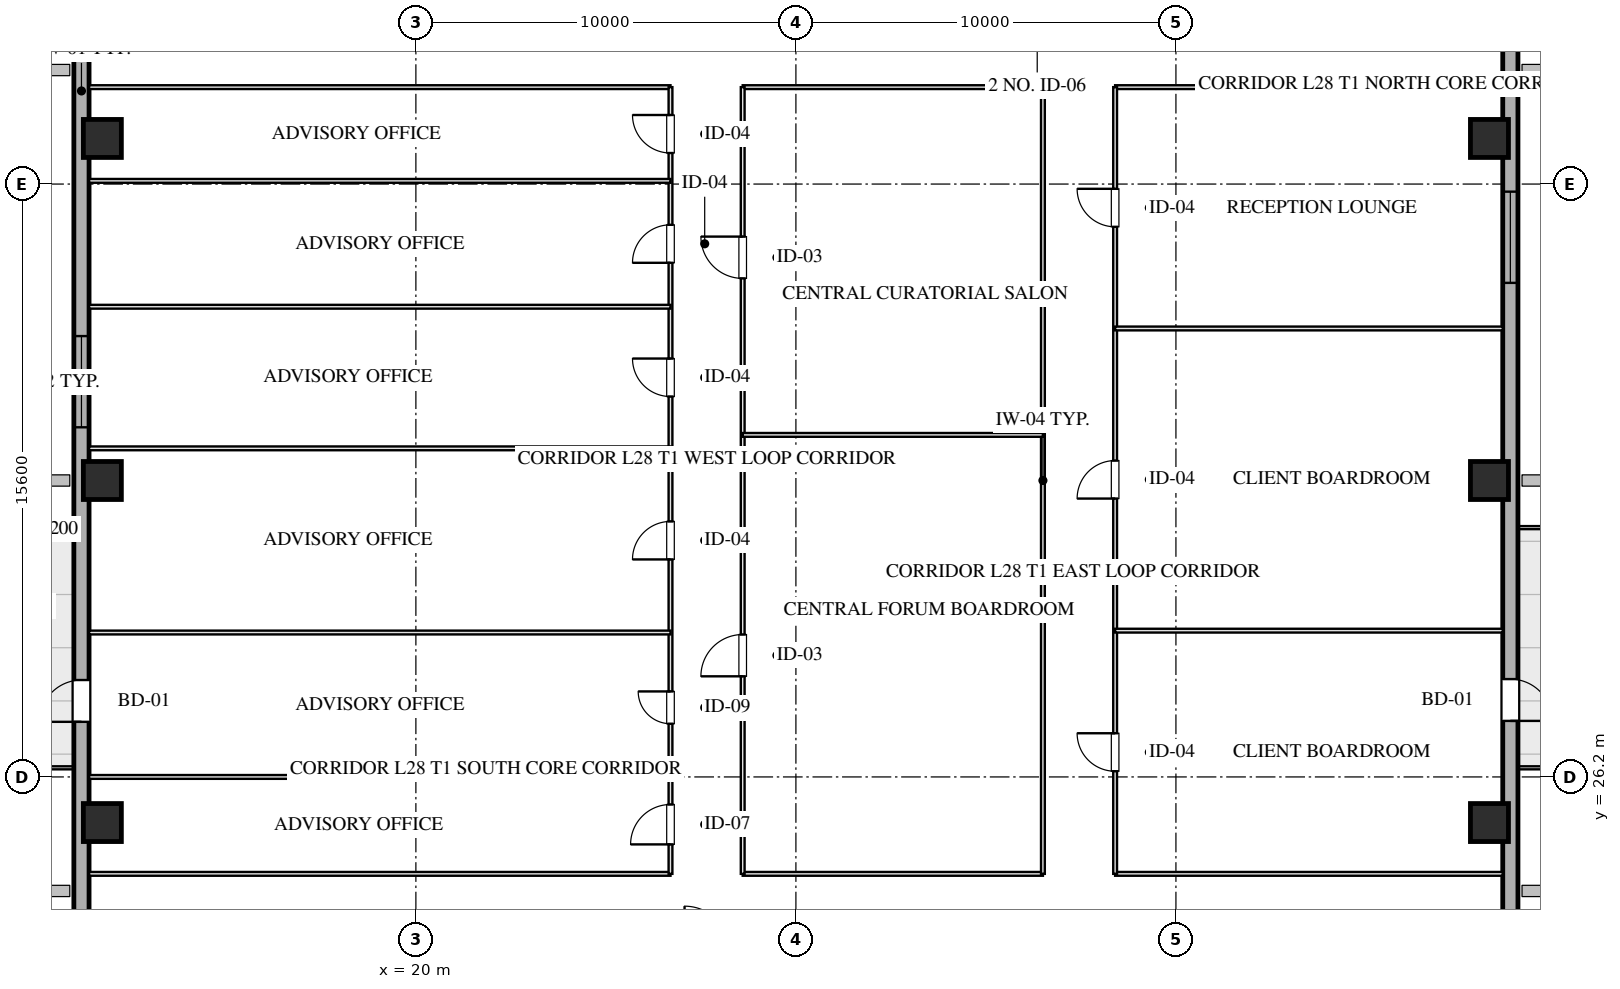
"""IFC4 building model, lengths in metres.
Left out: names, types, materials, properties, quantities, classifications, styles, units other than length and angle.
Written with IfcOpenShell. Run it as: python <this file> out.ifc"""

import sys

from ifc_helpers import new_model, si_unit, direction, frame, frame_2d, origin, origin_2d, place, context, subcontext, project, spatial, rectangle, hollow_rectangle, extrude, element, fill, save


model = new_model("IFC4")
c1 = context("Model", 3, precision=1e-05, world=origin(), true_north=direction((0.0, 1.0)))
c2 = subcontext(c1, "Body", "Model", "MODEL_VIEW")
j1 = project(units=[si_unit("LENGTHUNIT", "METRE"), si_unit("PLANEANGLEUNIT", "RADIAN")], contexts=[c1])
p1 = place(None, origin())
s1 = spatial("IfcSite", under=j1, at=p1, CompositionType="ELEMENT")
p2 = place(p1, origin())
s2 = spatial("IfcBuilding", under=s1, at=p2, CompositionType="ELEMENT")
p3 = place(p2, frame((0.0, 0.0, 110.4)))
s3 = spatial("IfcBuildingStorey", under=s2, at=p3, CompositionType="ELEMENT", Elevation=110.4)
for number, where, z_axis, x_axis in (
    (1, (11.75, 25.0, 0.0), (0.0, 0.0, 1.0), (1.0, 0.0, 0.0)),
    (2, (11.75, 34.0, 0.0), (0.0, 0.0, 1.0), (1.0, 0.0, 0.0)),
    (3, (11.75, 43.0, 0.0), (0.0, 0.0, 1.0), (1.0, 0.0, 0.0)),
    (4, (48.25, 25.0, 0.0), (0.0, 0.0, 1.0), (1.0, 0.0, 0.0)),
    (5, (48.25, 34.0, 0.0), (0.0, 0.0, 1.0), (1.0, 0.0, 0.0)),
    (6, (48.25, 43.0, 0.0), (0.0, 0.0, 1.0), (1.0, 0.0, 0.0)),
):
    element("IfcColumn", number, at=place(p3, frame(where, z_axis=z_axis, x_axis=x_axis)), inside=s3, PredefinedType="COLUMN", context=c2, shape_type="SweptSolid", body=[
        extrude(hollow_rectangle(XDim=1.0, YDim=1.0, WallThickness=0.036, at=origin_2d()), origin(), (0.0, 0.0, 1.0), 3.451),
    ])
p4 = place(p3, frame((11.2, 9.0, 0.0), z_axis=(0.0, 0.0, 1.0), x_axis=(0.0, 1.0, 0.0)))
e7 = element("IfcWall", 7, at=p4, inside=s3, PredefinedType="SOLIDWALL", context=c2, shape_type="SweptSolid", body=[
    extrude(rectangle(XDim=50.0, YDim=0.4, at=frame_2d((25.0, 0.0))), origin(), (0.0, 0.0, 1.0), 2.61),
])
p5 = place(p4, frame((26.4, 0.0, 0.75)))
e8 = element("IfcOpeningElement", 8, at=p5, cuts=e7, PredefinedType="OPENING", context=c2, shape_type="SweptSolid", body=[
    extrude(rectangle(XDim=2.4, YDim=1.46, at=frame_2d((1.2, 0.73))), frame((0.0, 0.21, 0.0), z_axis=(0.0, -1.0, 0.0), x_axis=(1.0, 0.0, 0.0)), (0.0, 0.0, 1.0), 0.42),
])
p6 = place(p4, frame((18.65, 0.0, 0.0)))
e9 = element("IfcOpeningElement", 9, at=p6, cuts=e7, PredefinedType="OPENING", context=c2, shape_type="SweptSolid", body=[
    extrude(rectangle(XDim=1.1, YDim=2.15, at=frame_2d((0.55, 1.075))), frame((0.0, 0.21, 0.0), z_axis=(0.0, -1.0, 0.0), x_axis=(1.0, 0.0, 0.0)), (0.0, 0.0, 1.0), 0.42),
])
p7 = place(p3, frame((48.8, 59.0, 0.0), z_axis=(0.0, 0.0, 1.0), x_axis=(0.0, -1.0, 0.0)))
e10 = element("IfcWall", 10, at=p7, inside=s3, PredefinedType="SOLIDWALL", context=c2, shape_type="SweptSolid", body=[
    extrude(rectangle(XDim=50.0, YDim=0.4, at=frame_2d((25.0, 0.0))), origin(), (0.0, 0.0, 1.0), 2.61),
])
p8 = place(p7, frame((17.4, 0.0, 0.75)))
e11 = element("IfcOpeningElement", 11, at=p8, cuts=e10, PredefinedType="OPENING", context=c2, shape_type="SweptSolid", body=[
    extrude(rectangle(XDim=2.4, YDim=1.46, at=frame_2d((1.2, 0.73))), frame((0.0, 0.21, 0.0), z_axis=(0.0, -1.0, 0.0), x_axis=(1.0, 0.0, 0.0)), (0.0, 0.0, 1.0), 0.42),
])
p9 = place(p7, frame((30.226, 0.0, 0.0)))
e12 = element("IfcOpeningElement", 12, at=p9, cuts=e10, PredefinedType="OPENING", context=c2, shape_type="SweptSolid", body=[
    extrude(rectangle(XDim=1.1, YDim=2.15, at=frame_2d((0.55, 1.075))), frame((0.0, 0.21, 0.0), z_axis=(0.0, -1.0, 0.0), x_axis=(1.0, 0.0, 0.0)), (0.0, 0.0, 1.0), 0.42),
])
p10 = place(p3, frame((11.4, 23.65, 0.0), z_axis=(0.0, 0.0, 1.0), x_axis=(1.0, 0.0, 0.0)))
e13 = element("IfcWall", 13, at=p10, inside=s3, PredefinedType="MOVABLE", context=c2, shape_type="SweptSolid", body=[
    extrude(rectangle(XDim=15.3, YDim=0.1, at=frame_2d((7.65, 0.0))), origin(), (0.0, 0.0, 1.0), 3.175),
])
p11 = place(p3, frame((28.6, 23.65, 0.0), z_axis=(0.0, 0.0, 1.0), x_axis=(1.0, 0.0, 0.0)))
e14 = element("IfcWall", 14, at=p11, inside=s3, PredefinedType="MOVABLE", context=c2, shape_type="SweptSolid", body=[
    extrude(rectangle(XDim=7.9, YDim=0.1, at=frame_2d((3.95, 0.0))), origin(), (0.0, 0.0, 1.0), 3.175),
])
p12 = place(p3, frame((38.4, 23.65, 0.0), z_axis=(0.0, 0.0, 1.0), x_axis=(1.0, 0.0, 0.0)))
e15 = element("IfcWall", 15, at=p12, inside=s3, PredefinedType="MOVABLE", context=c2, shape_type="SweptSolid", body=[
    extrude(rectangle(XDim=10.2, YDim=0.1, at=frame_2d((5.1, 0.0))), origin(), (0.0, 0.0, 1.0), 3.175),
])
p13 = place(p3, frame((11.4, 44.35, 0.0), z_axis=(0.0, 0.0, 1.0), x_axis=(1.0, 0.0, 0.0)))
e16 = element("IfcWall", 16, at=p13, inside=s3, PredefinedType="MOVABLE", context=c2, shape_type="SweptSolid", body=[
    extrude(rectangle(XDim=15.3, YDim=0.1, at=frame_2d((7.65, 0.0))), origin(), (0.0, 0.0, 1.0), 3.175),
])
p14 = place(p3, frame((28.6, 44.35, 0.0), z_axis=(0.0, 0.0, 1.0), x_axis=(1.0, 0.0, 0.0)))
e17 = element("IfcWall", 17, at=p14, inside=s3, PredefinedType="MOVABLE", context=c2, shape_type="SweptSolid", body=[
    extrude(rectangle(XDim=7.9, YDim=0.1, at=frame_2d((3.95, 0.0))), origin(), (0.0, 0.0, 1.0), 3.175),
])
p15 = place(p3, frame((38.4, 44.35, 0.0), z_axis=(0.0, 0.0, 1.0), x_axis=(1.0, 0.0, 0.0)))
e18 = element("IfcWall", 18, at=p15, inside=s3, PredefinedType="MOVABLE", context=c2, shape_type="SweptSolid", body=[
    extrude(rectangle(XDim=10.2, YDim=0.1, at=frame_2d((5.1, 0.0))), origin(), (0.0, 0.0, 1.0), 3.175),
])
p16 = place(p3, frame((26.7, 23.65, 0.0), z_axis=(0.0, 0.0, 1.0), x_axis=(0.0, 1.0, 0.0)))
e19 = element("IfcWall", 19, at=p16, inside=s3, PredefinedType="MOVABLE", context=c2, shape_type="SweptSolid", body=[
    extrude(rectangle(XDim=20.7, YDim=0.1, at=frame_2d((10.35, 0.0))), origin(), (0.0, 0.0, 1.0), 3.175),
])
p17 = place(p16, frame((0.775, 0.0, 0.0)))
e20 = element("IfcOpeningElement", 20, at=p17, cuts=e19, PredefinedType="OPENING", context=c2, shape_type="SweptSolid", body=[
    extrude(rectangle(XDim=1.05, YDim=2.05, at=frame_2d((0.525, 1.025))), frame((0.0, 0.06, 0.0), z_axis=(0.0, -1.0, 0.0), x_axis=(1.0, 0.0, 0.0)), (0.0, 0.0, 1.0), 0.12),
])
p18 = place(p16, frame((3.95, 0.0, 0.0)))
e21 = element("IfcOpeningElement", 21, at=p18, cuts=e19, PredefinedType="OPENING", context=c2, shape_type="SweptSolid", body=[
    extrude(rectangle(XDim=0.85, YDim=2.05, at=frame_2d((0.425, 1.025))), frame((0.0, 0.06, 0.0), z_axis=(0.0, -1.0, 0.0), x_axis=(1.0, 0.0, 0.0)), (0.0, 0.0, 1.0), 0.12),
])
p19 = place(p16, frame((8.273, 0.0, 0.0)))
e22 = element("IfcOpeningElement", 22, at=p19, cuts=e19, PredefinedType="OPENING", context=c2, shape_type="SweptSolid", body=[
    extrude(rectangle(XDim=1.0, YDim=2.05, at=frame_2d((0.5, 1.025))), frame((0.0, 0.06, 0.0), z_axis=(0.0, -1.0, 0.0), x_axis=(1.0, 0.0, 0.0)), (0.0, 0.0, 1.0), 0.12),
])
p20 = place(p16, frame((12.559, 0.0, 0.0)))
e23 = element("IfcOpeningElement", 23, at=p20, cuts=e19, PredefinedType="OPENING", context=c2, shape_type="SweptSolid", body=[
    extrude(rectangle(XDim=1.0, YDim=2.05, at=frame_2d((0.5, 1.025))), frame((0.0, 0.06, 0.0), z_axis=(0.0, -1.0, 0.0), x_axis=(1.0, 0.0, 0.0)), (0.0, 0.0, 1.0), 0.12),
])
p21 = place(p16, frame((16.078, 0.0, 0.0)))
e24 = element("IfcOpeningElement", 24, at=p21, cuts=e19, PredefinedType="OPENING", context=c2, shape_type="SweptSolid", body=[
    extrude(rectangle(XDim=1.0, YDim=2.05, at=frame_2d((0.5, 1.025))), frame((0.0, 0.06, 0.0), z_axis=(0.0, -1.0, 0.0), x_axis=(1.0, 0.0, 0.0)), (0.0, 0.0, 1.0), 0.12),
])
p22 = place(p16, frame((18.967, 0.0, 0.0)))
e25 = element("IfcOpeningElement", 25, at=p22, cuts=e19, PredefinedType="OPENING", context=c2, shape_type="SweptSolid", body=[
    extrude(rectangle(XDim=1.0, YDim=2.05, at=frame_2d((0.5, 1.025))), frame((0.0, 0.06, 0.0), z_axis=(0.0, -1.0, 0.0), x_axis=(1.0, 0.0, 0.0)), (0.0, 0.0, 1.0), 0.12),
])
p23 = place(p3, frame((28.6, 23.65, 0.0), z_axis=(0.0, 0.0, 1.0), x_axis=(0.0, 1.0, 0.0)))
e26 = element("IfcWall", 26, at=p23, inside=s3, PredefinedType="MOVABLE", context=c2, shape_type="SweptSolid", body=[
    extrude(rectangle(XDim=20.7, YDim=0.1, at=frame_2d((10.35, 0.0))), origin(), (0.0, 0.0, 1.0), 3.175),
])
p24 = place(p23, frame((5.198, 0.0, 0.0)))
e27 = element("IfcOpeningElement", 27, at=p24, cuts=e26, PredefinedType="OPENING", context=c2, shape_type="SweptSolid", body=[
    extrude(rectangle(XDim=1.1, YDim=2.05, at=frame_2d((0.55, 1.025))), frame((0.0, 0.06, 0.0), z_axis=(0.0, -1.0, 0.0), x_axis=(1.0, 0.0, 0.0)), (0.0, 0.0, 1.0), 0.12),
])
p25 = place(p23, frame((15.667, 0.0, 0.0)))
e28 = element("IfcOpeningElement", 28, at=p25, cuts=e26, PredefinedType="OPENING", context=c2, shape_type="SweptSolid", body=[
    extrude(rectangle(XDim=1.1, YDim=2.05, at=frame_2d((0.55, 1.025))), frame((0.0, 0.06, 0.0), z_axis=(0.0, -1.0, 0.0), x_axis=(1.0, 0.0, 0.0)), (0.0, 0.0, 1.0), 0.12),
])
p26 = place(p3, frame((36.5, 23.65, 0.0), z_axis=(0.0, 0.0, 1.0), x_axis=(0.0, 1.0, 0.0)))
e29 = element("IfcWall", 29, at=p26, inside=s3, PredefinedType="MOVABLE", context=c2, shape_type="SweptSolid", body=[
    extrude(rectangle(XDim=20.7, YDim=0.1, at=frame_2d((10.35, 0.0))), origin(), (0.0, 0.0, 1.0), 3.175),
])
p27 = place(p3, frame((38.4, 23.65, 0.0), z_axis=(0.0, 0.0, 1.0), x_axis=(0.0, 1.0, 0.0)))
e30 = element("IfcWall", 30, at=p27, inside=s3, PredefinedType="MOVABLE", context=c2, shape_type="SweptSolid", body=[
    extrude(rectangle(XDim=20.7, YDim=0.1, at=frame_2d((10.35, 0.0))), origin(), (0.0, 0.0, 1.0), 3.175),
])
p28 = place(p27, frame((2.699, 0.0, 0.0)))
e31 = element("IfcOpeningElement", 31, at=p28, cuts=e30, PredefinedType="OPENING", context=c2, shape_type="SweptSolid", body=[
    extrude(rectangle(XDim=1.0, YDim=2.05, at=frame_2d((0.5, 1.025))), frame((0.0, 0.06, 0.0), z_axis=(0.0, -1.0, 0.0), x_axis=(1.0, 0.0, 0.0)), (0.0, 0.0, 1.0), 0.12),
])
p29 = place(p27, frame((9.875, 0.0, 0.0)))
e32 = element("IfcOpeningElement", 32, at=p29, cuts=e30, PredefinedType="OPENING", context=c2, shape_type="SweptSolid", body=[
    extrude(rectangle(XDim=1.0, YDim=2.05, at=frame_2d((0.5, 1.025))), frame((0.0, 0.06, 0.0), z_axis=(0.0, -1.0, 0.0), x_axis=(1.0, 0.0, 0.0)), (0.0, 0.0, 1.0), 0.12),
])
p30 = place(p27, frame((17.025, 0.0, 0.0)))
e33 = element("IfcOpeningElement", 33, at=p30, cuts=e30, PredefinedType="OPENING", context=c2, shape_type="SweptSolid", body=[
    extrude(rectangle(XDim=1.0, YDim=2.05, at=frame_2d((0.5, 1.025))), frame((0.0, 0.06, 0.0), z_axis=(0.0, -1.0, 0.0), x_axis=(1.0, 0.0, 0.0)), (0.0, 0.0, 1.0), 0.12),
])
p31 = place(p3, frame((28.6, 35.2, 0.0), z_axis=(0.0, 0.0, 1.0), x_axis=(1.0, 0.0, 0.0)))
e34 = element("IfcWall", 34, at=p31, inside=s3, PredefinedType="MOVABLE", context=c2, shape_type="SweptSolid", body=[
    extrude(rectangle(XDim=7.9, YDim=0.1, at=frame_2d((3.95, 0.0))), origin(), (0.0, 0.0, 1.0), 3.175),
])
for number, where, z_axis, x_axis in (
    (35, (11.4, 26.2, 0.0), (0.0, 0.0, 1.0), (1.0, 0.0, 0.0)),
    (36, (11.4, 30.0, 0.0), (0.0, 0.0, 1.0), (1.0, 0.0, 0.0)),
    (37, (11.4, 34.846, 0.0), (0.0, 0.0, 1.0), (1.0, 0.0, 0.0)),
    (38, (11.4, 38.572, 0.0), (0.0, 0.0, 1.0), (1.0, 0.0, 0.0)),
    (39, (11.4, 41.884, 0.0), (0.0, 0.0, 1.0), (1.0, 0.0, 0.0)),
):
    element("IfcWall", number, at=place(p3, frame(where, z_axis=z_axis, x_axis=x_axis)), inside=s3, PredefinedType="MOVABLE", context=c2, shape_type="SweptSolid", body=[
        extrude(rectangle(XDim=15.3, YDim=0.1, at=frame_2d((7.65, 0.0))), origin(), (0.0, 0.0, 1.0), 3.175),
    ])
for number, where, z_axis, x_axis in (
    (40, (38.4, 30.049, 0.0), (0.0, 0.0, 1.0), (1.0, 0.0, 0.0)),
    (41, (38.4, 38.0, 0.0), (0.0, 0.0, 1.0), (1.0, 0.0, 0.0)),
):
    element("IfcWall", number, at=place(p3, frame(where, z_axis=z_axis, x_axis=x_axis)), inside=s3, PredefinedType="MOVABLE", context=c2, shape_type="SweptSolid", body=[
        extrude(rectangle(XDim=10.2, YDim=0.1, at=frame_2d((5.1, 0.0))), origin(), (0.0, 0.0, 1.0), 3.175),
    ])
p32 = place(p5, origin())
e42 = element("IfcWindow", 42, at=p32, inside=s3, PartitioningType="TRIPLE_PANEL_VERTICAL", PredefinedType="WINDOW", context=c2, shape_type="SweptSolid", body=[
    extrude(rectangle(XDim=2.4, YDim=1.46, at=frame_2d((1.2, 0.73))), frame((0.0, 0.03, 0.0), z_axis=(0.0, -1.0, 0.0), x_axis=(1.0, 0.0, 0.0)), (0.0, 0.0, 1.0), 0.06),
])
fill(e8, e42)
p33 = place(p8, origin())
e43 = element("IfcWindow", 43, at=p33, inside=s3, PartitioningType="TRIPLE_PANEL_VERTICAL", PredefinedType="WINDOW", context=c2, shape_type="SweptSolid", body=[
    extrude(rectangle(XDim=2.4, YDim=1.46, at=frame_2d((1.2, 0.73))), frame((0.0, 0.03, 0.0), z_axis=(0.0, -1.0, 0.0), x_axis=(1.0, 0.0, 0.0)), (0.0, 0.0, 1.0), 0.06),
])
fill(e11, e43)
p34 = place(p6, origin())
e44 = element("IfcDoor", 44, at=p34, inside=s3, OperationType="SINGLE_SWING_LEFT", PredefinedType="DOOR", context=c2, shape_type="SweptSolid", body=[
    extrude(rectangle(XDim=1.1, YDim=2.15, at=frame_2d((0.55, 1.075))), frame((0.0, 0.025, 0.0), z_axis=(0.0, -1.0, 0.0), x_axis=(1.0, 0.0, 0.0)), (0.0, 0.0, 1.0), 0.05),
])
fill(e9, e44)
p35 = place(p9, origin())
e45 = element("IfcDoor", 45, at=p35, inside=s3, OperationType="SINGLE_SWING_RIGHT", PredefinedType="DOOR", context=c2, shape_type="SweptSolid", body=[
    extrude(rectangle(XDim=1.1, YDim=2.15, at=frame_2d((0.55, 1.075))), frame((0.0, 0.025, 0.0), z_axis=(0.0, -1.0, 0.0), x_axis=(1.0, 0.0, 0.0)), (0.0, 0.0, 1.0), 0.05),
])
fill(e12, e45)
p36 = place(p17, origin())
e46 = element("IfcDoor", 46, at=p36, inside=s3, OperationType="SINGLE_SWING_LEFT", PredefinedType="DOOR", context=c2, shape_type="SweptSolid", body=[
    extrude(rectangle(XDim=1.05, YDim=2.05, at=frame_2d((0.525, 1.025))), frame((0.0, 0.025, 0.0), z_axis=(0.0, -1.0, 0.0), x_axis=(1.0, 0.0, 0.0)), (0.0, 0.0, 1.0), 0.05),
])
fill(e20, e46)
p37 = place(p18, origin())
e47 = element("IfcDoor", 47, at=p37, inside=s3, OperationType="SINGLE_SWING_RIGHT", PredefinedType="DOOR", context=c2, shape_type="SweptSolid", body=[
    extrude(rectangle(XDim=0.85, YDim=2.05, at=frame_2d((0.425, 1.025))), frame((0.0, 0.025, 0.0), z_axis=(0.0, -1.0, 0.0), x_axis=(1.0, 0.0, 0.0)), (0.0, 0.0, 1.0), 0.05),
])
fill(e21, e47)
p38 = place(p19, origin())
e48 = element("IfcDoor", 48, at=p38, inside=s3, OperationType="SINGLE_SWING_LEFT", PredefinedType="DOOR", context=c2, shape_type="SweptSolid", body=[
    extrude(rectangle(XDim=1.0, YDim=2.05, at=frame_2d((0.5, 1.025))), frame((0.0, 0.025, 0.0), z_axis=(0.0, -1.0, 0.0), x_axis=(1.0, 0.0, 0.0)), (0.0, 0.0, 1.0), 0.05),
])
fill(e22, e48)
p39 = place(p20, origin())
e49 = element("IfcDoor", 49, at=p39, inside=s3, OperationType="SINGLE_SWING_RIGHT", PredefinedType="DOOR", context=c2, shape_type="SweptSolid", body=[
    extrude(rectangle(XDim=1.0, YDim=2.05, at=frame_2d((0.5, 1.025))), frame((0.0, 0.025, 0.0), z_axis=(0.0, -1.0, 0.0), x_axis=(1.0, 0.0, 0.0)), (0.0, 0.0, 1.0), 0.05),
])
fill(e23, e49)
p40 = place(p21, origin())
e50 = element("IfcDoor", 50, at=p40, inside=s3, OperationType="SINGLE_SWING_LEFT", PredefinedType="DOOR", context=c2, shape_type="SweptSolid", body=[
    extrude(rectangle(XDim=1.0, YDim=2.05, at=frame_2d((0.5, 1.025))), frame((0.0, 0.025, 0.0), z_axis=(0.0, -1.0, 0.0), x_axis=(1.0, 0.0, 0.0)), (0.0, 0.0, 1.0), 0.05),
])
fill(e24, e50)
p41 = place(p22, origin())
e51 = element("IfcDoor", 51, at=p41, inside=s3, OperationType="SINGLE_SWING_RIGHT", PredefinedType="DOOR", context=c2, shape_type="SweptSolid", body=[
    extrude(rectangle(XDim=1.0, YDim=2.05, at=frame_2d((0.5, 1.025))), frame((0.0, 0.025, 0.0), z_axis=(0.0, -1.0, 0.0), x_axis=(1.0, 0.0, 0.0)), (0.0, 0.0, 1.0), 0.05),
])
fill(e25, e51)
p42 = place(p24, origin())
e52 = element("IfcDoor", 52, at=p42, inside=s3, OperationType="SINGLE_SWING_LEFT", PredefinedType="DOOR", context=c2, shape_type="SweptSolid", body=[
    extrude(rectangle(XDim=1.1, YDim=2.05, at=frame_2d((0.55, 1.025))), frame((0.0, 0.025, 0.0), z_axis=(0.0, -1.0, 0.0), x_axis=(1.0, 0.0, 0.0)), (0.0, 0.0, 1.0), 0.05),
])
fill(e27, e52)
p43 = place(p25, origin())
e53 = element("IfcDoor", 53, at=p43, inside=s3, OperationType="SINGLE_SWING_RIGHT", PredefinedType="DOOR", context=c2, shape_type="SweptSolid", body=[
    extrude(rectangle(XDim=1.1, YDim=2.05, at=frame_2d((0.55, 1.025))), frame((0.0, 0.025, 0.0), z_axis=(0.0, -1.0, 0.0), x_axis=(1.0, 0.0, 0.0)), (0.0, 0.0, 1.0), 0.05),
])
fill(e28, e53)
p44 = place(p28, origin())
e54 = element("IfcDoor", 54, at=p44, inside=s3, OperationType="SINGLE_SWING_RIGHT", PredefinedType="DOOR", context=c2, shape_type="SweptSolid", body=[
    extrude(rectangle(XDim=1.0, YDim=2.05, at=frame_2d((0.5, 1.025))), frame((0.0, 0.025, 0.0), z_axis=(0.0, -1.0, 0.0), x_axis=(1.0, 0.0, 0.0)), (0.0, 0.0, 1.0), 0.05),
])
fill(e31, e54)
p45 = place(p29, origin())
e55 = element("IfcDoor", 55, at=p45, inside=s3, OperationType="SINGLE_SWING_LEFT", PredefinedType="DOOR", context=c2, shape_type="SweptSolid", body=[
    extrude(rectangle(XDim=1.0, YDim=2.05, at=frame_2d((0.5, 1.025))), frame((0.0, 0.025, 0.0), z_axis=(0.0, -1.0, 0.0), x_axis=(1.0, 0.0, 0.0)), (0.0, 0.0, 1.0), 0.05),
])
fill(e32, e55)
p46 = place(p30, origin())
e56 = element("IfcDoor", 56, at=p46, inside=s3, OperationType="SINGLE_SWING_RIGHT", PredefinedType="DOOR", context=c2, shape_type="SweptSolid", body=[
    extrude(rectangle(XDim=1.0, YDim=2.05, at=frame_2d((0.5, 1.025))), frame((0.0, 0.025, 0.0), z_axis=(0.0, -1.0, 0.0), x_axis=(1.0, 0.0, 0.0)), (0.0, 0.0, 1.0), 0.05),
])
fill(e33, e56)
save(model, sys.argv[1])
